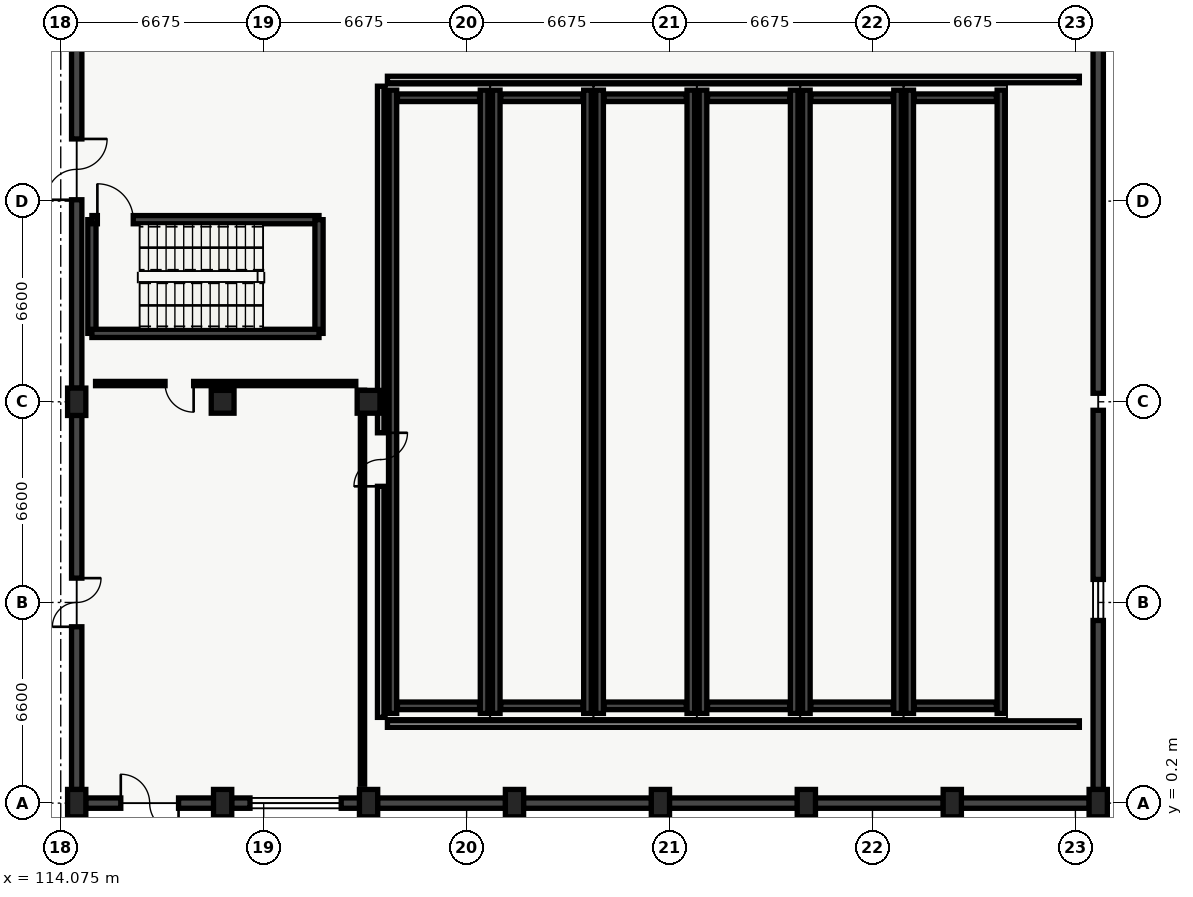
"""IFC4 building model, lengths in metres.
Left out: names, types, materials, properties, quantities, classifications, styles, units other than length and angle.
Written with IfcOpenShell. Run it as: python <this file> out.ifc"""

import sys

from ifc_helpers import new_model, si_unit, direction, frame, frame_2d, origin, origin_2d, place, context, subcontext, project, spatial, rectangle, circle, extrude, element, fill, save


model = new_model("IFC4")
c1 = context("Model", 3, precision=1e-05, world=origin(), true_north=direction((0.0, 1.0)))
c2 = subcontext(c1, "Body", "Model", "MODEL_VIEW")
j1 = project(units=[si_unit("LENGTHUNIT", "METRE"), si_unit("PLANEANGLEUNIT", "RADIAN")], contexts=[c1])
p1 = place(None, origin())
s1 = spatial("IfcSite", under=j1, at=p1, CompositionType="ELEMENT")
p2 = place(p1, origin())
s2 = spatial("IfcBuilding", under=s1, at=p2, CompositionType="ELEMENT")
p3 = place(p2, origin())
s3 = spatial("IfcBuildingStorey", under=s2, at=p3, CompositionType="ELEMENT", Elevation=0.0)
for number, where, z_axis, x_axis in (
    (1, (125.0, 3.15, 0.0), (0.0, 0.0, 1.0), (0.0, 1.0, 0.0)),
    (2, (128.0, 3.15, 0.0), (0.0, 0.0, 1.0), (0.0, 1.0, 0.0)),
):
    element("IfcWall", number, at=place(p3, frame(where, z_axis=z_axis, x_axis=x_axis)), inside=s3, PredefinedType="SHEAR", context=c2, shape_type="SweptSolid", body=[
        extrude(rectangle(XDim=20.5, YDim=0.25, at=frame_2d((10.25, 0.0))), origin(), (0.0, 0.0, 1.0), 0.315),
    ])
for number, where, z_axis, x_axis in (
    (3, (125.15, 3.4, 0.0), (0.0, 0.0, 1.0), (1.0, 0.0, 0.0)),
    (4, (125.15, 23.4, 0.0), (0.0, 0.0, 1.0), (1.0, 0.0, 0.0)),
):
    element("IfcWall", number, at=place(p3, frame(where, z_axis=z_axis, x_axis=x_axis)), inside=s3, PredefinedType="SHEAR", context=c2, shape_type="SweptSolid", body=[
        extrude(rectangle(XDim=2.7, YDim=0.25, at=frame_2d((1.35, 0.0))), origin(), (0.0, 0.0, 1.0), 0.315),
    ])
for number, where, z_axis, x_axis in (
    (5, (128.4, 3.15, 0.0), (0.0, 0.0, 1.0), (0.0, 1.0, 0.0)),
    (6, (131.4, 3.15, 0.0), (0.0, 0.0, 1.0), (0.0, 1.0, 0.0)),
):
    element("IfcWall", number, at=place(p3, frame(where, z_axis=z_axis, x_axis=x_axis)), inside=s3, PredefinedType="SHEAR", context=c2, shape_type="SweptSolid", body=[
        extrude(rectangle(XDim=20.5, YDim=0.25, at=frame_2d((10.25, 0.0))), origin(), (0.0, 0.0, 1.0), 0.795),
    ])
for number, where, z_axis, x_axis in (
    (7, (128.55, 3.4, 0.0), (0.0, 0.0, 1.0), (1.0, 0.0, 0.0)),
    (8, (128.55, 23.4, 0.0), (0.0, 0.0, 1.0), (1.0, 0.0, 0.0)),
):
    element("IfcWall", number, at=place(p3, frame(where, z_axis=z_axis, x_axis=x_axis)), inside=s3, PredefinedType="SHEAR", context=c2, shape_type="SweptSolid", body=[
        extrude(rectangle(XDim=2.7, YDim=0.25, at=frame_2d((1.35, 0.0))), origin(), (0.0, 0.0, 1.0), 0.795),
    ])
for number, where, z_axis, x_axis in (
    (9, (131.8, 3.15, 0.0), (0.0, 0.0, 1.0), (0.0, 1.0, 0.0)),
    (10, (134.8, 3.15, 0.0), (0.0, 0.0, 1.0), (0.0, 1.0, 0.0)),
):
    element("IfcWall", number, at=place(p3, frame(where, z_axis=z_axis, x_axis=x_axis)), inside=s3, PredefinedType="SHEAR", context=c2, shape_type="SweptSolid", body=[
        extrude(rectangle(XDim=20.5, YDim=0.25, at=frame_2d((10.25, 0.0))), origin(), (0.0, 0.0, 1.0), 1.275),
    ])
for number, where, z_axis, x_axis in (
    (11, (131.95, 3.4, 0.0), (0.0, 0.0, 1.0), (1.0, 0.0, 0.0)),
    (12, (131.95, 23.4, 0.0), (0.0, 0.0, 1.0), (1.0, 0.0, 0.0)),
):
    element("IfcWall", number, at=place(p3, frame(where, z_axis=z_axis, x_axis=x_axis)), inside=s3, PredefinedType="SHEAR", context=c2, shape_type="SweptSolid", body=[
        extrude(rectangle(XDim=2.7, YDim=0.25, at=frame_2d((1.35, 0.0))), origin(), (0.0, 0.0, 1.0), 1.275),
    ])
for number, where, z_axis, x_axis in (
    (13, (135.2, 3.15, 0.0), (0.0, 0.0, 1.0), (0.0, 1.0, 0.0)),
    (14, (138.2, 3.15, 0.0), (0.0, 0.0, 1.0), (0.0, 1.0, 0.0)),
):
    element("IfcWall", number, at=place(p3, frame(where, z_axis=z_axis, x_axis=x_axis)), inside=s3, PredefinedType="SHEAR", context=c2, shape_type="SweptSolid", body=[
        extrude(rectangle(XDim=20.5, YDim=0.25, at=frame_2d((10.25, 0.0))), origin(), (0.0, 0.0, 1.0), 1.755),
    ])
for number, where, z_axis, x_axis in (
    (15, (135.35, 3.4, 0.0), (0.0, 0.0, 1.0), (1.0, 0.0, 0.0)),
    (16, (135.35, 23.4, 0.0), (0.0, 0.0, 1.0), (1.0, 0.0, 0.0)),
):
    element("IfcWall", number, at=place(p3, frame(where, z_axis=z_axis, x_axis=x_axis)), inside=s3, PredefinedType="SHEAR", context=c2, shape_type="SweptSolid", body=[
        extrude(rectangle(XDim=2.7, YDim=0.25, at=frame_2d((1.35, 0.0))), origin(), (0.0, 0.0, 1.0), 1.755),
    ])
for number, where, z_axis, x_axis in (
    (17, (138.6, 3.15, 0.0), (0.0, 0.0, 1.0), (0.0, 1.0, 0.0)),
    (18, (141.6, 3.15, 0.0), (0.0, 0.0, 1.0), (0.0, 1.0, 0.0)),
):
    element("IfcWall", number, at=place(p3, frame(where, z_axis=z_axis, x_axis=x_axis)), inside=s3, PredefinedType="SHEAR", context=c2, shape_type="SweptSolid", body=[
        extrude(rectangle(XDim=20.5, YDim=0.25, at=frame_2d((10.25, 0.0))), origin(), (0.0, 0.0, 1.0), 2.235),
    ])
for number, where, z_axis, x_axis in (
    (19, (138.75, 3.4, 0.0), (0.0, 0.0, 1.0), (1.0, 0.0, 0.0)),
    (20, (138.75, 23.4, 0.0), (0.0, 0.0, 1.0), (1.0, 0.0, 0.0)),
):
    element("IfcWall", number, at=place(p3, frame(where, z_axis=z_axis, x_axis=x_axis)), inside=s3, PredefinedType="SHEAR", context=c2, shape_type="SweptSolid", body=[
        extrude(rectangle(XDim=2.7, YDim=0.25, at=frame_2d((1.35, 0.0))), origin(), (0.0, 0.0, 1.0), 2.235),
    ])
for number, where, z_axis, x_axis in (
    (21, (142.0, 3.15, 0.0), (0.0, 0.0, 1.0), (0.0, 1.0, 0.0)),
    (22, (145.0, 3.15, 0.0), (0.0, 0.0, 1.0), (0.0, 1.0, 0.0)),
):
    element("IfcWall", number, at=place(p3, frame(where, z_axis=z_axis, x_axis=x_axis)), inside=s3, PredefinedType="SHEAR", context=c2, shape_type="SweptSolid", body=[
        extrude(rectangle(XDim=20.5, YDim=0.25, at=frame_2d((10.25, 0.0))), origin(), (0.0, 0.0, 1.0), 2.715),
    ])
for number, where, z_axis, x_axis in (
    (23, (142.15, 3.4, 0.0), (0.0, 0.0, 1.0), (1.0, 0.0, 0.0)),
    (24, (142.15, 23.4, 0.0), (0.0, 0.0, 1.0), (1.0, 0.0, 0.0)),
):
    element("IfcWall", number, at=place(p3, frame(where, z_axis=z_axis, x_axis=x_axis)), inside=s3, PredefinedType="SHEAR", context=c2, shape_type="SweptSolid", body=[
        extrude(rectangle(XDim=2.7, YDim=0.25, at=frame_2d((1.35, 0.0))), origin(), (0.0, 0.0, 1.0), 2.715),
    ])
for number, where, z_axis, x_axis in (
    (25, (114.6, 0.2, 0.0), (0.0, 0.0, 1.0), (1.0, 0.0, 0.0)),
    (26, (114.6, 13.4, 0.0), (0.0, 0.0, 1.0), (1.0, 0.0, 0.0)),
    (27, (119.4, 0.2, 0.0), (0.0, 0.0, 1.0), (1.0, 0.0, 0.0)),
):
    element("IfcColumn", number, at=place(p3, frame(where, z_axis=z_axis, x_axis=x_axis)), inside=s3, PredefinedType="COLUMN", context=c2, shape_type="SweptSolid", body=[
        extrude(rectangle(XDim=0.6, YDim=0.9, at=origin_2d()), origin(), (0.0, 0.0, 1.0), 4.68),
    ])
p4 = place(p3, frame((119.4, 13.4, 0.0), z_axis=(0.0, 0.0, 1.0), x_axis=(1.0, 0.0, 0.0)))
e28 = element("IfcColumn", 28, at=p4, inside=s3, PredefinedType="COLUMN", context=c2, shape_type="SweptSolid", body=[
    extrude(circle(Radius=0.375, at=origin_2d()), origin(), (0.0, 0.0, 1.0), 4.68),
])
p5 = place(p3, frame((124.2, 0.2, 0.0), z_axis=(0.0, 0.0, 1.0), x_axis=(1.0, 0.0, 0.0)))
e29 = element("IfcColumn", 29, at=p5, inside=s3, PredefinedType="COLUMN", context=c2, shape_type="SweptSolid", body=[
    extrude(rectangle(XDim=0.6, YDim=0.9, at=origin_2d()), origin(), (0.0, 0.0, 1.0), 4.68),
])
p6 = place(p3, frame((124.2, 13.4, 0.0), z_axis=(0.0, 0.0, 1.0), x_axis=(1.0, 0.0, 0.0)))
e30 = element("IfcColumn", 30, at=p6, inside=s3, PredefinedType="COLUMN", context=c2, shape_type="SweptSolid", body=[
    extrude(circle(Radius=0.375, at=origin_2d()), origin(), (0.0, 0.0, 1.0), 4.68),
])
for number, where, z_axis, x_axis in (
    (31, (129.0, 0.2, 0.0), (0.0, 0.0, 1.0), (1.0, 0.0, 0.0)),
    (32, (133.8, 0.2, 0.0), (0.0, 0.0, 1.0), (1.0, 0.0, 0.0)),
    (33, (138.6, 0.2, 0.0), (0.0, 0.0, 1.0), (1.0, 0.0, 0.0)),
    (34, (143.4, 0.2, 0.0), (0.0, 0.0, 1.0), (1.0, 0.0, 0.0)),
    (35, (148.2, 0.2, 0.0), (0.0, 0.0, 1.0), (1.0, 0.0, 0.0)),
):
    element("IfcColumn", number, at=place(p3, frame(where, z_axis=z_axis, x_axis=x_axis)), inside=s3, PredefinedType="COLUMN", context=c2, shape_type="SweptSolid", body=[
        extrude(rectangle(XDim=0.6, YDim=0.9, at=origin_2d()), origin(), (0.0, 0.0, 1.0), 4.68),
    ])
p7 = place(p3, frame((114.6, 0.645, 0.0), z_axis=(0.0, 0.0, 1.0), x_axis=(0.0, 1.0, 0.0)))
e36 = element("IfcWall", 36, at=p7, inside=s3, PredefinedType="SOLIDWALL", context=c2, shape_type="SweptSolid", body=[
    extrude(rectangle(XDim=12.31, YDim=0.34, at=frame_2d((6.155, 0.0))), origin(), (0.0, 0.0, 1.0), 4.215),
])
p8 = place(p7, frame((5.355, 0.0, 0.0)))
e37 = element("IfcOpeningElement", 37, at=p8, cuts=e36, PredefinedType="OPENING", context=c2, shape_type="SweptSolid", body=[
    extrude(rectangle(XDim=1.6, YDim=2.2, at=frame_2d((0.8, 1.1))), frame((0.0, 0.17, 0.0), z_axis=(0.0, -1.0, 0.0), x_axis=(1.0, 0.0, 0.0)), (0.0, 0.0, 1.0), 0.34),
])
p9 = place(p3, frame((114.6, 13.845, 0.0), z_axis=(0.0, 0.0, 1.0), x_axis=(0.0, 1.0, 0.0)))
e38 = element("IfcWall", 38, at=p9, inside=s3, PredefinedType="SOLIDWALL", context=c2, shape_type="SweptSolid", body=[
    extrude(rectangle(XDim=12.31, YDim=0.34, at=frame_2d((6.155, 0.0))), origin(), (0.0, 0.0, 1.0), 4.215),
])
p10 = place(p9, frame((6.2, 0.0, 0.0)))
e39 = element("IfcOpeningElement", 39, at=p10, cuts=e38, PredefinedType="OPENING", context=c2, shape_type="SweptSolid", body=[
    extrude(rectangle(XDim=2.0, YDim=2.25, at=frame_2d((1.0, 1.125))), frame((0.0, 0.17, 0.0), z_axis=(0.0, -1.0, 0.0), x_axis=(1.0, 0.0, 0.0)), (0.0, 0.0, 1.0), 0.34),
])
p11 = place(p3, frame((148.2, 26.155, 0.0), z_axis=(0.0, 0.0, 1.0), x_axis=(0.0, -1.0, 0.0)))
e40 = element("IfcWall", 40, at=p11, inside=s3, PredefinedType="SOLIDWALL", context=c2, shape_type="SweptSolid", body=[
    extrude(rectangle(XDim=12.475, YDim=0.34, at=frame_2d((6.238, 0.0))), origin(), (0.0, 0.0, 1.0), 4.88),
])
p12 = place(p3, frame((148.2, 13.12, 0.0), z_axis=(0.0, 0.0, 1.0), x_axis=(0.0, -1.0, 0.0)))
e41 = element("IfcWall", 41, at=p12, inside=s3, PredefinedType="SOLIDWALL", context=c2, shape_type="SweptSolid", body=[
    extrude(rectangle(XDim=12.475, YDim=0.34, at=frame_2d((6.238, 0.0))), origin(), (0.0, 0.0, 1.0), 4.88),
])
p13 = place(p12, frame((5.562, 0.0, 0.95)))
e42 = element("IfcOpeningElement", 42, at=p13, cuts=e41, PredefinedType="OPENING", context=c2, shape_type="SweptSolid", body=[
    extrude(rectangle(XDim=1.35, YDim=1.8, at=frame_2d((0.675, 0.9))), frame((0.0, 0.17, 0.0), z_axis=(0.0, -1.0, 0.0), x_axis=(1.0, 0.0, 0.0)), (0.0, 0.0, 1.0), 0.34),
])
for number, where, z_axis, x_axis in (
    (43, (147.905, 0.2, 0.0), (0.0, 0.0, 1.0), (-1.0, 0.0, 0.0)),
    (44, (143.105, 0.2, 0.0), (0.0, 0.0, 1.0), (-1.0, 0.0, 0.0)),
    (45, (138.305, 0.2, 0.0), (0.0, 0.0, 1.0), (-1.0, 0.0, 0.0)),
    (46, (133.505, 0.2, 0.0), (0.0, 0.0, 1.0), (-1.0, 0.0, 0.0)),
    (47, (128.705, 0.2, 0.0), (0.0, 0.0, 1.0), (-1.0, 0.0, 0.0)),
):
    element("IfcWall", number, at=place(p3, frame(where, z_axis=z_axis, x_axis=x_axis)), inside=s3, PredefinedType="SOLIDWALL", context=c2, shape_type="SweptSolid", body=[
        extrude(rectangle(XDim=4.21, YDim=0.34, at=frame_2d((2.105, 0.0))), origin(), (0.0, 0.0, 1.0), 4.215),
    ])
p14 = place(p3, frame((123.905, 0.2, 0.0), z_axis=(0.0, 0.0, 1.0), x_axis=(-1.0, 0.0, 0.0)))
e48 = element("IfcWall", 48, at=p14, inside=s3, PredefinedType="SOLIDWALL", context=c2, shape_type="SweptSolid", body=[
    extrude(rectangle(XDim=4.21, YDim=0.34, at=frame_2d((2.105, 0.0))), origin(), (0.0, 0.0, 1.0), 4.215),
])
p15 = place(p14, frame((0.605, 0.0, 0.95)))
e49 = element("IfcOpeningElement", 49, at=p15, cuts=e48, PredefinedType="OPENING", context=c2, shape_type="SweptSolid", body=[
    extrude(rectangle(XDim=3.0, YDim=1.65, at=frame_2d((1.5, 0.825))), frame((0.0, 0.17, 0.0), z_axis=(0.0, -1.0, 0.0), x_axis=(1.0, 0.0, 0.0)), (0.0, 0.0, 1.0), 0.34),
])
p16 = place(p3, frame((119.105, 0.2, 0.0), z_axis=(0.0, 0.0, 1.0), x_axis=(-1.0, 0.0, 0.0)))
e50 = element("IfcWall", 50, at=p16, inside=s3, PredefinedType="SOLIDWALL", context=c2, shape_type="SweptSolid", body=[
    extrude(rectangle(XDim=4.21, YDim=0.34, at=frame_2d((2.105, 0.0))), origin(), (0.0, 0.0, 1.0), 4.215),
])
p17 = place(p16, frame((1.155, 0.0, 0.0)))
e51 = element("IfcOpeningElement", 51, at=p17, cuts=e50, PredefinedType="OPENING", context=c2, shape_type="SweptSolid", body=[
    extrude(rectangle(XDim=1.9, YDim=2.25, at=frame_2d((0.95, 1.125))), frame((0.0, 0.17, 0.0), z_axis=(0.0, -1.0, 0.0), x_axis=(1.0, 0.0, 0.0)), (0.0, 0.0, 1.0), 0.34),
])
p18 = place(p3, frame((115.1, 15.65, 0.0), z_axis=(0.0, 0.0, 1.0), x_axis=(0.0, 1.0, 0.0)))
e52 = element("IfcWall", 52, at=p18, inside=s3, PredefinedType="SHEAR", context=c2, shape_type="SweptSolid", body=[
    extrude(rectangle(XDim=3.74, YDim=0.27, at=frame_2d((1.87, 0.0))), origin(), (0.0, 0.0, 1.0), 4.88),
])
p19 = place(p3, frame((115.1, 19.39, 0.0), z_axis=(0.0, 0.0, 1.0), x_axis=(1.0, 0.0, 0.0)))
e53 = element("IfcWall", 53, at=p19, inside=s3, PredefinedType="SHEAR", context=c2, shape_type="SweptSolid", body=[
    extrude(rectangle(XDim=7.47, YDim=0.27, at=frame_2d((3.735, 0.0))), origin(), (0.0, 0.0, 1.0), 4.88),
])
p20 = place(p19, frame((0.18, 0.0, 0.0)))
e54 = element("IfcOpeningElement", 54, at=p20, cuts=e53, PredefinedType="OPENING", context=c2, shape_type="SweptSolid", body=[
    extrude(rectangle(XDim=1.18, YDim=2.15, at=frame_2d((0.59, 1.075))), frame((0.0, 0.135, 0.0), z_axis=(0.0, -1.0, 0.0), x_axis=(1.0, 0.0, 0.0)), (0.0, 0.0, 1.0), 0.27),
])
p21 = place(p3, frame((122.57, 19.39, 0.0), z_axis=(0.0, 0.0, 1.0), x_axis=(0.0, -1.0, 0.0)))
e55 = element("IfcWall", 55, at=p21, inside=s3, PredefinedType="SHEAR", context=c2, shape_type="SweptSolid", body=[
    extrude(rectangle(XDim=3.74, YDim=0.27, at=frame_2d((1.87, 0.0))), origin(), (0.0, 0.0, 1.0), 4.88),
])
p22 = place(p3, frame((122.57, 15.65, 0.0), z_axis=(0.0, 0.0, 1.0), x_axis=(-1.0, 0.0, 0.0)))
e56 = element("IfcWall", 56, at=p22, inside=s3, PredefinedType="SHEAR", context=c2, shape_type="SweptSolid", body=[
    extrude(rectangle(XDim=7.47, YDim=0.27, at=frame_2d((3.735, 0.0))), origin(), (0.0, 0.0, 1.0), 4.88),
])
p23 = place(p3, frame((124.0, 0.82, 0.0), z_axis=(0.0, 0.0, 1.0), x_axis=(0.0, 1.0, 0.0)))
e57 = element("IfcWall", 57, at=p23, inside=s3, PredefinedType="PARTITIONING", context=c2, shape_type="SweptSolid", body=[
    extrude(rectangle(XDim=12.96, YDim=0.14, at=frame_2d((6.48, 0.0))), origin(), (0.0, 0.0, 1.0), 4.55),
])
p24 = place(p3, frame((123.78, 14.0, 0.0), z_axis=(0.0, 0.0, 1.0), x_axis=(-1.0, 0.0, 0.0)))
e58 = element("IfcWall", 58, at=p24, inside=s3, PredefinedType="PARTITIONING", context=c2, shape_type="SweptSolid", body=[
    extrude(rectangle(XDim=8.56, YDim=0.14, at=frame_2d((4.28, 0.0))), origin(), (0.0, 0.0, 1.0), 4.55),
])
p25 = place(p24, frame((5.334, 0.0, 0.0)))
e59 = element("IfcOpeningElement", 59, at=p25, cuts=e58, PredefinedType="OPENING", context=c2, shape_type="SweptSolid", body=[
    extrude(rectangle(XDim=0.94, YDim=2.12, at=frame_2d((0.47, 1.06))), frame((0.0, 0.07, 0.0), z_axis=(0.0, -1.0, 0.0), x_axis=(1.0, 0.0, 0.0)), (0.0, 0.0, 1.0), 0.14),
])
for number, where, z_axis, x_axis in (
    (60, (124.82, 2.8, 0.0), (0.0, 0.0, 1.0), (1.0, 0.0, 0.0)),
    (61, (147.58, 24.0, 0.0), (0.0, 0.0, 1.0), (-1.0, 0.0, 0.0)),
):
    element("IfcWall", number, at=place(p3, frame(where, z_axis=z_axis, x_axis=x_axis)), inside=s3, PredefinedType="SOLIDWALL", context=c2, shape_type="SweptSolid", body=[
        extrude(rectangle(XDim=22.76, YDim=0.215, at=frame_2d((11.38, 0.0))), origin(), (0.0, 0.0, 1.0), 4.55),
    ])
p26 = place(p3, frame((124.6, 23.78, 0.0), z_axis=(0.0, 0.0, 1.0), x_axis=(0.0, -1.0, 0.0)))
e62 = element("IfcWall", 62, at=p26, inside=s3, PredefinedType="SOLIDWALL", context=c2, shape_type="SweptSolid", body=[
    extrude(rectangle(XDim=20.76, YDim=0.215, at=frame_2d((10.38, 0.0))), origin(), (0.0, 0.0, 1.0), 4.55),
])
p27 = place(p26, frame((11.4, 0.0, 0.0)))
e63 = element("IfcOpeningElement", 63, at=p27, cuts=e62, PredefinedType="OPENING", context=c2, shape_type="SweptSolid", body=[
    extrude(rectangle(XDim=1.76, YDim=2.25, at=frame_2d((0.88, 1.125))), frame((0.0, 0.107, 0.0), z_axis=(0.0, -1.0, 0.0), x_axis=(1.0, 0.0, 0.0)), (0.0, 0.0, 1.0), 0.215),
])
p28 = place(p8, origin())
e64 = element("IfcDoor", 64, at=p28, inside=s3, OperationType="DOUBLE_DOOR_SINGLE_SWING", PredefinedType="DOOR", context=c2, shape_type="SweptSolid", body=[
    extrude(rectangle(XDim=1.6, YDim=2.2, at=frame_2d((0.8, 1.1))), frame((0.0, 0.025, 0.0), z_axis=(0.0, -1.0, 0.0), x_axis=(1.0, 0.0, 0.0)), (0.0, 0.0, 1.0), 0.05),
])
fill(e37, e64)
p29 = place(p10, origin())
e65 = element("IfcDoor", 65, at=p29, inside=s3, OperationType="DOUBLE_DOOR_SINGLE_SWING", PredefinedType="DOOR", context=c2, shape_type="SweptSolid", body=[
    extrude(rectangle(XDim=2.0, YDim=2.25, at=frame_2d((1.0, 1.125))), frame((0.0, 0.025, 0.0), z_axis=(0.0, -1.0, 0.0), x_axis=(1.0, 0.0, 0.0)), (0.0, 0.0, 1.0), 0.05),
])
fill(e39, e65)
p30 = place(p13, origin())
e66 = element("IfcWindow", 66, at=p30, inside=s3, PartitioningType="SINGLE_PANEL", PredefinedType="WINDOW", context=c2, shape_type="SweptSolid", body=[
    extrude(rectangle(XDim=1.35, YDim=1.8, at=frame_2d((0.675, 0.9))), frame((0.0, 0.03, 0.0), z_axis=(0.0, -1.0, 0.0), x_axis=(1.0, 0.0, 0.0)), (0.0, 0.0, 1.0), 0.06),
])
fill(e42, e66)
p31 = place(p15, origin())
e67 = element("IfcWindow", 67, at=p31, inside=s3, PartitioningType="SINGLE_PANEL", PredefinedType="WINDOW", context=c2, shape_type="SweptSolid", body=[
    extrude(rectangle(XDim=3.0, YDim=1.65, at=frame_2d((1.5, 0.825))), frame((0.0, 0.03, 0.0), z_axis=(0.0, -1.0, 0.0), x_axis=(1.0, 0.0, 0.0)), (0.0, 0.0, 1.0), 0.06),
])
fill(e49, e67)
p32 = place(p17, origin())
e68 = element("IfcDoor", 68, at=p32, inside=s3, OperationType="DOUBLE_DOOR_SINGLE_SWING", PredefinedType="DOOR", context=c2, shape_type="SweptSolid", body=[
    extrude(rectangle(XDim=1.9, YDim=2.25, at=frame_2d((0.95, 1.125))), frame((0.0, 0.025, 0.0), z_axis=(0.0, -1.0, 0.0), x_axis=(1.0, 0.0, 0.0)), (0.0, 0.0, 1.0), 0.05),
])
fill(e51, e68)
p33 = place(p20, origin())
e69 = element("IfcDoor", 69, at=p33, inside=s3, OperationType="SINGLE_SWING_LEFT", PredefinedType="DOOR", context=c2, shape_type="SweptSolid", body=[
    extrude(rectangle(XDim=1.18, YDim=2.15, at=frame_2d((0.59, 1.075))), frame((0.0, 0.025, 0.0), z_axis=(0.0, -1.0, 0.0), x_axis=(1.0, 0.0, 0.0)), (0.0, 0.0, 1.0), 0.05),
])
fill(e54, e69)
p34 = place(p25, origin())
e70 = element("IfcDoor", 70, at=p34, inside=s3, OperationType="SINGLE_SWING_LEFT", PredefinedType="DOOR", context=c2, shape_type="SweptSolid", body=[
    extrude(rectangle(XDim=0.94, YDim=2.12, at=frame_2d((0.47, 1.06))), frame((0.0, 0.025, 0.0), z_axis=(0.0, -1.0, 0.0), x_axis=(1.0, 0.0, 0.0)), (0.0, 0.0, 1.0), 0.05),
])
fill(e59, e70)
p35 = place(p27, origin())
e71 = element("IfcDoor", 71, at=p35, inside=s3, OperationType="DOUBLE_DOOR_SINGLE_SWING", PredefinedType="DOOR", context=c2, shape_type="SweptSolid", body=[
    extrude(rectangle(XDim=1.76, YDim=2.25, at=frame_2d((0.88, 1.125))), frame((0.0, 0.025, 0.0), z_axis=(0.0, -1.0, 0.0), x_axis=(1.0, 0.0, 0.0)), (0.0, 0.0, 1.0), 0.05),
])
fill(e63, e71)
save(model, sys.argv[1])
